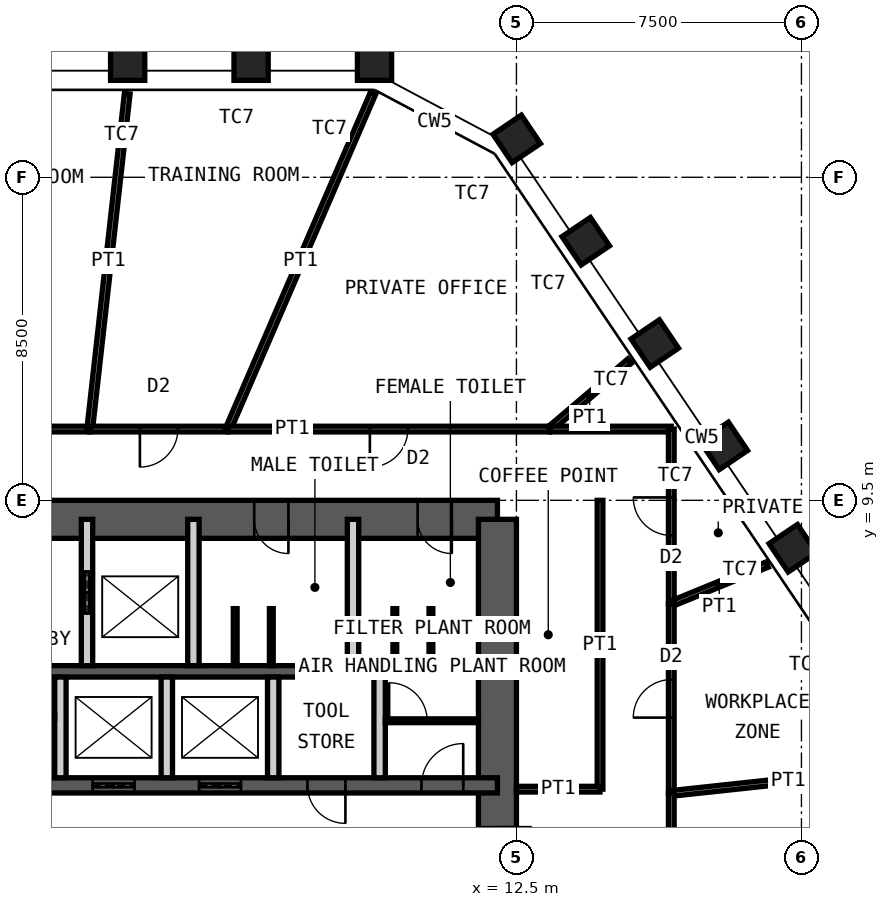
"""IFC4 building model, lengths in metres.
Left out: names, types, materials, properties, quantities, classifications, styles, units other than length and angle.
Written with IfcOpenShell. Run it as: python <this file> out.ifc"""

import sys

from ifc_helpers import new_model, si_unit, direction, frame, frame_2d, origin, origin_2d, place, context, subcontext, project, spatial, rectangle, hollow_rectangle, extrude, element, fill, save


model = new_model("IFC4")
c1 = context("Model", 3, precision=1e-05, world=origin(), true_north=direction((0.0, 1.0)))
c2 = subcontext(c1, "Body", "Model", "MODEL_VIEW")
j1 = project(units=[si_unit("LENGTHUNIT", "METRE"), si_unit("PLANEANGLEUNIT", "RADIAN")], contexts=[c1])
p1 = place(None, origin())
s1 = spatial("IfcSite", under=j1, at=p1, CompositionType="ELEMENT")
p2 = place(p1, origin())
s2 = spatial("IfcBuilding", under=s1, at=p2, CompositionType="ELEMENT")
p3 = place(p2, frame((0.0, 0.0, 278.8)))
s3 = spatial("IfcBuildingStorey", under=s2, at=p3, CompositionType="ELEMENT", Elevation=278.8)
for number, where, z_axis, x_axis in (
    (1, (2.27, 21.0, 0.0), (0.0, 0.0, 1.0), (-1.0, 0.0, 0.0)),
    (2, (5.518, 21.0, 0.0), (0.0, 0.0, 1.0), (-1.0, 0.0, 0.0)),
    (3, (8.766, 21.0, 0.0), (0.0, 0.0, 1.0), (-1.0, 0.0, 0.0)),
    (4, (12.508, 19.01, 0.0), (0.0, 0.0, 1.0), (-0.559, 0.829, 0.0)),
    (5, (14.324, 16.318, 0.0), (0.0, 0.0, 1.0), (-0.559, 0.829, 0.0)),
    (6, (16.141, 13.625, 0.0), (0.0, 0.0, 1.0), (-0.559, 0.829, 0.0)),
    (7, (17.957, 10.932, 0.0), (0.0, 0.0, 1.0), (-0.559, 0.829, 0.0)),
    (8, (19.773, 8.239, 0.0), (0.0, 0.0, 1.0), (-0.559, 0.829, 0.0)),
):
    element("IfcColumn", number, at=place(p3, frame(where, z_axis=z_axis, x_axis=x_axis)), inside=s3, PredefinedType="COLUMN", context=c2, shape_type="SweptSolid", body=[
        extrude(hollow_rectangle(XDim=0.9, YDim=0.9, WallThickness=0.06, at=origin_2d()), origin(), (0.0, 0.0, 1.0), 4.2),
    ])
p4 = place(p3, frame((-12.0, 9.0, 0.0), z_axis=(0.0, 0.0, 1.0), x_axis=(1.0, 0.0, 0.0)))
e9 = element("IfcWall", 9, at=p4, inside=s3, PredefinedType="SHEAR", context=c2, shape_type="SweptSolid", body=[
    extrude(rectangle(XDim=24.0, YDim=1.0, at=frame_2d((12.0, 0.0))), origin(), (0.0, 0.0, 1.0), 4.2),
])
p5 = place(p4, frame((10.4, 0.0, 0.0)))
e10 = element("IfcOpeningElement", 10, at=p5, cuts=e9, PredefinedType="OPENING", context=c2, shape_type="SweptSolid", body=[
    extrude(rectangle(XDim=1.0, YDim=2.1, at=frame_2d((0.5, 1.05))), frame((0.0, 0.51, 0.0), z_axis=(0.0, -1.0, 0.0), x_axis=(1.0, 0.0, 0.0)), (0.0, 0.0, 1.0), 1.02),
])
p6 = place(p4, frame((17.6, 0.0, 0.0)))
e11 = element("IfcOpeningElement", 11, at=p6, cuts=e9, PredefinedType="OPENING", context=c2, shape_type="SweptSolid", body=[
    extrude(rectangle(XDim=0.9, YDim=2.1, at=frame_2d((0.45, 1.05))), frame((0.0, 0.51, 0.0), z_axis=(0.0, -1.0, 0.0), x_axis=(1.0, 0.0, 0.0)), (0.0, 0.0, 1.0), 1.02),
])
p7 = place(p4, frame((21.9, 0.0, 0.0)))
e12 = element("IfcOpeningElement", 12, at=p7, cuts=e9, PredefinedType="OPENING", context=c2, shape_type="SweptSolid", body=[
    extrude(rectangle(XDim=0.9, YDim=2.1, at=frame_2d((0.45, 1.05))), frame((0.0, 0.51, 0.0), z_axis=(0.0, -1.0, 0.0), x_axis=(1.0, 0.0, 0.0)), (0.0, 0.0, 1.0), 1.02),
])
p8 = place(p3, frame((12.0, -9.0, 0.0), z_axis=(0.0, 0.0, 1.0), x_axis=(0.0, 1.0, 0.0)))
e13 = element("IfcWall", 13, at=p8, inside=s3, PredefinedType="SHEAR", context=c2, shape_type="SweptSolid", body=[
    extrude(rectangle(XDim=18.0, YDim=1.0, at=frame_2d((9.0, 0.0))), origin(), (0.0, 0.0, 1.0), 4.2),
])
p9 = place(p8, frame((8.1, 0.0, 0.0)))
e14 = element("IfcOpeningElement", 14, at=p9, cuts=e13, PredefinedType="OPENING", context=c2, shape_type="SweptSolid", body=[
    extrude(rectangle(XDim=1.8, YDim=2.1, at=frame_2d((0.9, 1.05))), frame((0.0, 0.51, 0.0), z_axis=(0.0, -1.0, 0.0), x_axis=(1.0, 0.0, 0.0)), (0.0, 0.0, 1.0), 1.02),
])
p10 = place(p3, frame((-12.0, 5.0, 0.0), z_axis=(0.0, 0.0, 1.0), x_axis=(1.0, 0.0, 0.0)))
e15 = element("IfcWall", 15, at=p10, inside=s3, PredefinedType="SHEAR", context=c2, shape_type="SweptSolid", body=[
    extrude(rectangle(XDim=24.0, YDim=0.3, at=frame_2d((12.0, 0.0))), origin(), (0.0, 0.0, 1.0), 4.2),
])
p11 = place(p3, frame((-12.0, 2.0, 0.0), z_axis=(0.0, 0.0, 1.0), x_axis=(1.0, 0.0, 0.0)))
e16 = element("IfcWall", 16, at=p11, inside=s3, PredefinedType="SHEAR", context=c2, shape_type="SweptSolid", body=[
    extrude(rectangle(XDim=24.0, YDim=0.4, at=frame_2d((12.0, 0.0))), origin(), (0.0, 0.0, 1.0), 4.2),
])
p12 = place(p11, frame((2.4, 0.0, 0.0)))
e17 = element("IfcOpeningElement", 17, at=p12, cuts=e16, PredefinedType="OPENING", context=c2, shape_type="SweptSolid", body=[
    extrude(rectangle(XDim=1.1, YDim=2.1, at=frame_2d((0.55, 1.05))), frame((0.0, 0.21, 0.0), z_axis=(0.0, -1.0, 0.0), x_axis=(1.0, 0.0, 0.0)), (0.0, 0.0, 1.0), 0.42),
])
p13 = place(p11, frame((22.0, 0.0, 0.0)))
e18 = element("IfcOpeningElement", 18, at=p13, cuts=e16, PredefinedType="OPENING", context=c2, shape_type="SweptSolid", body=[
    extrude(rectangle(XDim=1.1, YDim=2.1, at=frame_2d((0.55, 1.05))), frame((0.0, 0.21, 0.0), z_axis=(0.0, -1.0, 0.0), x_axis=(1.0, 0.0, 0.0)), (0.0, 0.0, 1.0), 0.42),
])
p14 = place(p11, frame((10.15, 0.0, 0.0)))
e19 = element("IfcOpeningElement", 19, at=p14, cuts=e16, PredefinedType="OPENING", context=c2, shape_type="SweptSolid", body=[
    extrude(rectangle(XDim=1.0, YDim=2.1, at=frame_2d((0.5, 1.05))), frame((0.0, 0.21, 0.0), z_axis=(0.0, -1.0, 0.0), x_axis=(1.0, 0.0, 0.0)), (0.0, 0.0, 1.0), 0.42),
])
p15 = place(p11, frame((6.9, 0.0, 0.0)))
e20 = element("IfcOpeningElement", 20, at=p15, cuts=e16, PredefinedType="OPENING", context=c2, shape_type="SweptSolid", body=[
    extrude(rectangle(XDim=1.0, YDim=2.1, at=frame_2d((0.5, 1.05))), frame((0.0, 0.21, 0.0), z_axis=(0.0, -1.0, 0.0), x_axis=(1.0, 0.0, 0.0)), (0.0, 0.0, 1.0), 0.42),
])
p16 = place(p11, frame((13.35, 0.0, 0.0)))
e21 = element("IfcOpeningElement", 21, at=p16, cuts=e16, PredefinedType="OPENING", context=c2, shape_type="SweptSolid", body=[
    extrude(rectangle(XDim=1.1, YDim=2.4, at=frame_2d((0.55, 1.2))), frame((0.0, 0.21, 0.0), z_axis=(0.0, -1.0, 0.0), x_axis=(1.0, 0.0, 0.0)), (0.0, 0.0, 1.0), 0.42),
])
p17 = place(p11, frame((16.15, 0.0, 0.0)))
e22 = element("IfcOpeningElement", 22, at=p17, cuts=e16, PredefinedType="OPENING", context=c2, shape_type="SweptSolid", body=[
    extrude(rectangle(XDim=1.1, YDim=2.4, at=frame_2d((0.55, 1.2))), frame((0.0, 0.21, 0.0), z_axis=(0.0, -1.0, 0.0), x_axis=(1.0, 0.0, 0.0)), (0.0, 0.0, 1.0), 0.42),
])
p18 = place(p11, frame((19.0, 0.0, 0.0)))
e23 = element("IfcOpeningElement", 23, at=p18, cuts=e16, PredefinedType="OPENING", context=c2, shape_type="SweptSolid", body=[
    extrude(rectangle(XDim=1.0, YDim=2.1, at=frame_2d((0.5, 1.05))), frame((0.0, 0.21, 0.0), z_axis=(0.0, -1.0, 0.0), x_axis=(1.0, 0.0, 0.0)), (0.0, 0.0, 1.0), 0.42),
])
p19 = place(p3, frame((1.2, 5.15, 0.0), z_axis=(0.0, 0.0, 1.0), x_axis=(0.0, 1.0, 0.0)))
e24 = element("IfcWall", 24, at=p19, inside=s3, PredefinedType="PARTITIONING", context=c2, shape_type="SweptSolid", body=[
    extrude(rectangle(XDim=3.85, YDim=0.3, at=frame_2d((1.925, 0.0))), origin(), (0.0, 0.0, 1.0), 3.98),
])
p20 = place(p19, frame((1.375, 0.0, 0.0)))
e25 = element("IfcOpeningElement", 25, at=p20, cuts=e24, PredefinedType="OPENING", context=c2, shape_type="SweptSolid", body=[
    extrude(rectangle(XDim=1.1, YDim=2.4, at=frame_2d((0.55, 1.2))), frame((0.0, 0.16, 0.0), z_axis=(0.0, -1.0, 0.0), x_axis=(1.0, 0.0, 0.0)), (0.0, 0.0, 1.0), 0.32),
])
for number, where, z_axis, x_axis in (
    (26, (4.0, 5.15, 0.0), (0.0, 0.0, 1.0), (0.0, 1.0, 0.0)),
    (27, (8.2, 5.15, 0.0), (0.0, 0.0, 1.0), (0.0, 1.0, 0.0)),
):
    element("IfcWall", number, at=place(p3, frame(where, z_axis=z_axis, x_axis=x_axis)), inside=s3, PredefinedType="PARTITIONING", context=c2, shape_type="SweptSolid", body=[
        extrude(rectangle(XDim=3.85, YDim=0.3, at=frame_2d((1.925, 0.0))), origin(), (0.0, 0.0, 1.0), 3.98),
    ])
for number, where, z_axis, x_axis in (
    (28, (0.5, 2.2, 0.0), (0.0, 0.0, 1.0), (0.0, 1.0, 0.0)),
    (29, (3.3, 2.2, 0.0), (0.0, 0.0, 1.0), (0.0, 1.0, 0.0)),
    (30, (6.1, 2.2, 0.0), (0.0, 0.0, 1.0), (0.0, 1.0, 0.0)),
    (31, (8.9, 2.2, 0.0), (0.0, 0.0, 1.0), (0.0, 1.0, 0.0)),
):
    element("IfcWall", number, at=place(p3, frame(where, z_axis=z_axis, x_axis=x_axis)), inside=s3, PredefinedType="PARTITIONING", context=c2, shape_type="SweptSolid", body=[
        extrude(rectangle(XDim=2.65, YDim=0.3, at=frame_2d((1.325, 0.0))), origin(), (0.0, 0.0, 1.0), 3.98),
    ])
p21 = place(p3, frame((-2.85, 3.8, 0.0), z_axis=(0.0, 0.0, 1.0), x_axis=(1.0, 0.0, 0.0)))
e32 = element("IfcWall", 32, at=p21, inside=s3, PredefinedType="PARTITIONING", context=c2, shape_type="SweptSolid", body=[
    extrude(rectangle(XDim=3.2, YDim=0.1, at=frame_2d((1.6, 0.0))), origin(), (0.0, 0.0, 1.0), 3.98),
])
p22 = place(p21, frame((0.1, 0.0, 0.0)))
e33 = element("IfcOpeningElement", 33, at=p22, cuts=e32, PredefinedType="OPENING", context=c2, shape_type="SweptSolid", body=[
    extrude(rectangle(XDim=1.0, YDim=2.4, at=frame_2d((0.5, 1.2))), frame((0.0, 0.06, 0.0), z_axis=(0.0, -1.0, 0.0), x_axis=(1.0, 0.0, 0.0)), (0.0, 0.0, 1.0), 0.12),
])
p23 = place(p3, frame((9.05, 3.7, 0.0), z_axis=(0.0, 0.0, 1.0), x_axis=(1.0, 0.0, 0.0)))
e34 = element("IfcWall", 34, at=p23, inside=s3, PredefinedType="PARTITIONING", context=c2, shape_type="SweptSolid", body=[
    extrude(rectangle(XDim=2.45, YDim=0.1, at=frame_2d((1.225, 0.0))), origin(), (0.0, 0.0, 1.0), 3.98),
])
p24 = place(p23, frame((0.1, 0.0, 0.0)))
e35 = element("IfcOpeningElement", 35, at=p24, cuts=e34, PredefinedType="OPENING", context=c2, shape_type="SweptSolid", body=[
    extrude(rectangle(XDim=1.0, YDim=2.4, at=frame_2d((0.5, 1.2))), frame((0.0, 0.06, 0.0), z_axis=(0.0, -1.0, 0.0), x_axis=(1.0, 0.0, 0.0)), (0.0, 0.0, 1.0), 0.12),
])
for number, where, z_axis, x_axis in (
    (36, (5.1, 5.15, 0.0), (0.0, 0.0, 1.0), (0.0, 1.0, 0.0)),
    (37, (6.05, 5.15, 0.0), (0.0, 0.0, 1.0), (0.0, 1.0, 0.0)),
    (38, (9.3, 5.15, 0.0), (0.0, 0.0, 1.0), (0.0, 1.0, 0.0)),
    (39, (10.25, 5.15, 0.0), (0.0, 0.0, 1.0), (0.0, 1.0, 0.0)),
):
    element("IfcWall", number, at=place(p3, frame(where, z_axis=z_axis, x_axis=x_axis)), inside=s3, PredefinedType="PARTITIONING", context=c2, shape_type="SweptSolid", body=[
        extrude(rectangle(XDim=1.5, YDim=0.1, at=frame_2d((0.75, 0.0))), origin(), (0.0, 0.0, 1.0), 2.1),
    ])
p25 = place(p3, frame((-2.368, 11.375, 0.0), z_axis=(0.0, 0.0, 1.0), x_axis=(1.0, 0.0, 0.0)))
e40 = element("IfcWall", 40, at=p25, inside=s3, PredefinedType="PARTITIONING", context=c2, shape_type="SweptSolid", body=[
    extrude(rectangle(XDim=3.64, YDim=0.15, at=frame_2d((1.82, 0.0))), origin(), (0.0, 0.0, 1.0), 4.03),
])
p26 = place(p25, frame((1.32, 0.0, 0.0)))
e41 = element("IfcOpeningElement", 41, at=p26, cuts=e40, PredefinedType="OPENING", context=c2, shape_type="SweptSolid", body=[
    extrude(rectangle(XDim=1.0, YDim=2.4, at=frame_2d((0.5, 1.2))), frame((0.0, 0.085, 0.0), z_axis=(0.0, -1.0, 0.0), x_axis=(1.0, 0.0, 0.0)), (0.0, 0.0, 1.0), 0.17),
])
p27 = place(p3, frame((2.259, 20.201, 0.0), z_axis=(0.0, 0.0, 1.0), x_axis=(-0.11111945026, -0.993807057619, 0.0)))
e42 = element("IfcWall", 42, at=p27, inside=s3, PredefinedType="PARTITIONING", context=c2, shape_type="SweptSolid", body=[
    extrude(rectangle(XDim=8.881, YDim=0.15, at=frame_2d((4.44, 0.0))), origin(), (0.0, 0.0, 1.0), 3.33),
])
p28 = place(p3, frame((1.272, 11.375, 0.0), z_axis=(0.0, 0.0, 1.0), x_axis=(1.0, 0.0, 0.0)))
e43 = element("IfcWall", 43, at=p28, inside=s3, PredefinedType="PARTITIONING", context=c2, shape_type="SweptSolid", body=[
    extrude(rectangle(XDim=3.64, YDim=0.15, at=frame_2d((1.82, 0.0))), origin(), (0.0, 0.0, 1.0), 4.03),
])
p29 = place(p28, frame((1.32, 0.0, 0.0)))
e44 = element("IfcOpeningElement", 44, at=p29, cuts=e43, PredefinedType="OPENING", context=c2, shape_type="SweptSolid", body=[
    extrude(rectangle(XDim=1.0, YDim=2.4, at=frame_2d((0.5, 1.2))), frame((0.0, 0.085, 0.0), z_axis=(0.0, -1.0, 0.0), x_axis=(1.0, 0.0, 0.0)), (0.0, 0.0, 1.0), 0.17),
])
p30 = place(p3, frame((8.726, 20.208, 0.0), z_axis=(0.0, 0.0, 1.0), x_axis=(-0.396444279146, -0.918058785445, 0.0)))
e45 = element("IfcWall", 45, at=p30, inside=s3, PredefinedType="PARTITIONING", context=c2, shape_type="SweptSolid", body=[
    extrude(rectangle(XDim=9.622, YDim=0.15, at=frame_2d((4.811, 0.0))), origin(), (0.0, 0.0, 1.0), 2.93),
])
p31 = place(p3, frame((4.912, 11.375, 0.0), z_axis=(0.0, 0.0, 1.0), x_axis=(1.0, 0.0, 0.0)))
e46 = element("IfcWall", 46, at=p31, inside=s3, PredefinedType="PARTITIONING", context=c2, shape_type="SweptSolid", body=[
    extrude(rectangle(XDim=8.463, YDim=0.15, at=frame_2d((4.231, 0.0))), origin(), (0.0, 0.0, 1.0), 4.03),
])
p32 = place(p31, frame((3.731, 0.0, 0.0)))
e47 = element("IfcOpeningElement", 47, at=p32, cuts=e46, PredefinedType="OPENING", context=c2, shape_type="SweptSolid", body=[
    extrude(rectangle(XDim=1.0, YDim=2.4, at=frame_2d((0.5, 1.2))), frame((0.0, 0.085, 0.0), z_axis=(0.0, -1.0, 0.0), x_axis=(1.0, 0.0, 0.0)), (0.0, 0.0, 1.0), 0.17),
])
p33 = place(p3, frame((15.484, 13.169, 0.0), z_axis=(0.0, 0.0, 1.0), x_axis=(-0.761734753955, -0.647889006403, 0.0)))
e48 = element("IfcWall", 48, at=p33, inside=s3, PredefinedType="PARTITIONING", context=c2, shape_type="SweptSolid", body=[
    extrude(rectangle(XDim=2.769, YDim=0.15, at=frame_2d((1.384, 0.0))), origin(), (0.0, 0.0, 1.0), 3.33),
])
p34 = place(p3, frame((13.375, 11.375, 0.0), z_axis=(0.0, 0.0, 1.0), x_axis=(1.0, 0.0, 0.0)))
e49 = element("IfcWall", 49, at=p34, inside=s3, PredefinedType="PARTITIONING", context=c2, shape_type="SweptSolid", body=[
    extrude(rectangle(XDim=3.2, YDim=0.15, at=frame_2d((1.6, 0.0))), origin(), (0.0, 0.0, 1.0), 4.03),
])
p35 = place(p3, frame((16.575, 11.375, 0.0), z_axis=(0.0, 0.0, 1.0), x_axis=(0.0, -1.0, 0.0)))
e50 = element("IfcWall", 50, at=p35, inside=s3, PredefinedType="PARTITIONING", context=c2, shape_type="SweptSolid", body=[
    extrude(rectangle(XDim=4.597, YDim=0.15, at=frame_2d((2.299, 0.0))), origin(), (0.0, 0.0, 1.0), 4.03),
])
p36 = place(p35, frame((1.799, 0.0, 0.0)))
e51 = element("IfcOpeningElement", 51, at=p36, cuts=e50, PredefinedType="OPENING", context=c2, shape_type="SweptSolid", body=[
    extrude(rectangle(XDim=1.0, YDim=2.4, at=frame_2d((0.5, 1.2))), frame((0.0, 0.085, 0.0), z_axis=(0.0, -1.0, 0.0), x_axis=(1.0, 0.0, 0.0)), (0.0, 0.0, 1.0), 0.17),
])
p37 = place(p3, frame((19.1, 7.81, 0.0), z_axis=(0.0, 0.0, 1.0), x_axis=(-0.925616791812, -0.378462091518, 0.0)))
e52 = element("IfcWall", 52, at=p37, inside=s3, PredefinedType="PARTITIONING", context=c2, shape_type="SweptSolid", body=[
    extrude(rectangle(XDim=2.728, YDim=0.15, at=frame_2d((1.364, 0.0))), origin(), (0.0, 0.0, 1.0), 3.33),
])
p38 = place(p3, frame((16.575, 6.778, 0.0), z_axis=(0.0, 0.0, 1.0), x_axis=(0.0, -1.0, 0.0)))
e53 = element("IfcWall", 53, at=p38, inside=s3, PredefinedType="PARTITIONING", context=c2, shape_type="SweptSolid", body=[
    extrude(rectangle(XDim=4.99, YDim=0.15, at=frame_2d((2.495, 0.0))), origin(), (0.0, 0.0, 1.0), 4.03),
])
p39 = place(p38, frame((1.995, 0.0, 0.0)))
e54 = element("IfcOpeningElement", 54, at=p39, cuts=e53, PredefinedType="OPENING", context=c2, shape_type="SweptSolid", body=[
    extrude(rectangle(XDim=1.0, YDim=2.4, at=frame_2d((0.5, 1.2))), frame((0.0, 0.085, 0.0), z_axis=(0.0, -1.0, 0.0), x_axis=(1.0, 0.0, 0.0)), (0.0, 0.0, 1.0), 0.17),
])
p40 = place(p3, frame((22.726, 2.452, 0.0), z_axis=(0.0, 0.0, 1.0), x_axis=(-0.994230957157, -0.107260448581, 0.0)))
e55 = element("IfcWall", 55, at=p40, inside=s3, PredefinedType="PARTITIONING", context=c2, shape_type="SweptSolid", body=[
    extrude(rectangle(XDim=6.187, YDim=0.15, at=frame_2d((3.093, 0.0))), origin(), (0.0, 0.0, 1.0), 4.03),
])
p41 = place(p3, frame((16.575, 1.788, 0.0), z_axis=(0.0, 0.0, 1.0), x_axis=(0.0, -1.0, 0.0)))
e56 = element("IfcWall", 56, at=p41, inside=s3, PredefinedType="PARTITIONING", context=c2, shape_type="SweptSolid", body=[
    extrude(rectangle(XDim=4.647, YDim=0.15, at=frame_2d((2.324, 0.0))), origin(), (0.0, 0.0, 1.0), 4.03),
])
p42 = place(p41, frame((1.824, 0.0, 0.0)))
e57 = element("IfcOpeningElement", 57, at=p42, cuts=e56, PredefinedType="OPENING", context=c2, shape_type="SweptSolid", body=[
    extrude(rectangle(XDim=1.0, YDim=2.4, at=frame_2d((0.5, 1.2))), frame((0.0, 0.085, 0.0), z_axis=(0.0, -1.0, 0.0), x_axis=(1.0, 0.0, 0.0)), (0.0, 0.0, 1.0), 0.17),
])
p43 = place(p3, frame((14.7, 1.9, 0.0), z_axis=(0.0, 0.0, 1.0), x_axis=(0.0, 1.0, 0.0)))
e58 = element("IfcWall", 58, at=p43, inside=s3, PredefinedType="PARTITIONING", context=c2, shape_type="SweptSolid", body=[
    extrude(rectangle(XDim=7.6, YDim=0.15, at=frame_2d((3.8, 0.0))), origin(), (0.0, 0.0, 1.0), 4.03),
])
p44 = place(p3, frame((12.5, 1.9, 0.0), z_axis=(0.0, 0.0, 1.0), x_axis=(1.0, 0.0, 0.0)))
e59 = element("IfcWall", 59, at=p44, inside=s3, PredefinedType="PARTITIONING", context=c2, shape_type="SweptSolid", body=[
    extrude(rectangle(XDim=2.2, YDim=0.15, at=frame_2d((1.1, 0.0))), origin(), (0.0, 0.0, 1.0), 2.93),
])
p45 = place(p6, origin())
e60 = element("IfcDoor", 60, at=p45, inside=s3, OperationType="SINGLE_SWING_RIGHT", PredefinedType="DOOR", context=c2, shape_type="SweptSolid", body=[
    extrude(rectangle(XDim=0.9, YDim=2.1, at=frame_2d((0.45, 1.05))), frame((0.0, 0.025, 0.0), z_axis=(0.0, -1.0, 0.0), x_axis=(1.0, 0.0, 0.0)), (0.0, 0.0, 1.0), 0.05),
])
fill(e11, e60)
p46 = place(p7, origin())
e61 = element("IfcDoor", 61, at=p46, inside=s3, OperationType="SINGLE_SWING_RIGHT", PredefinedType="DOOR", context=c2, shape_type="SweptSolid", body=[
    extrude(rectangle(XDim=0.9, YDim=2.1, at=frame_2d((0.45, 1.05))), frame((0.0, 0.025, 0.0), z_axis=(0.0, -1.0, 0.0), x_axis=(1.0, 0.0, 0.0)), (0.0, 0.0, 1.0), 0.05),
])
fill(e12, e61)
p47 = place(p13, origin())
e62 = element("IfcDoor", 62, at=p47, inside=s3, OperationType="SINGLE_SWING_LEFT", PredefinedType="DOOR", context=c2, shape_type="SweptSolid", body=[
    extrude(rectangle(XDim=1.1, YDim=2.1, at=frame_2d((0.55, 1.05))), frame((0.0, 0.025, 0.0), z_axis=(0.0, -1.0, 0.0), x_axis=(1.0, 0.0, 0.0)), (0.0, 0.0, 1.0), 0.05),
])
fill(e18, e62)
p48 = place(p9, origin())
e63 = element("IfcDoor", 63, at=p48, inside=s3, OperationType="DOUBLE_DOOR_DOUBLE_SWING", PredefinedType="DOOR", context=c2, shape_type="SweptSolid", body=[
    extrude(rectangle(XDim=1.8, YDim=2.1, at=frame_2d((0.9, 1.05))), frame((0.0, 0.025, 0.0), z_axis=(0.0, -1.0, 0.0), x_axis=(1.0, 0.0, 0.0)), (0.0, 0.0, 1.0), 0.05),
])
fill(e14, e63)
p49 = place(p20, origin())
e64 = element("IfcDoor", 64, at=p49, inside=s3, OperationType="DOUBLE_DOOR_SLIDING", PredefinedType="DOOR", context=c2, shape_type="SweptSolid", body=[
    extrude(rectangle(XDim=1.1, YDim=2.4, at=frame_2d((0.55, 1.2))), frame((0.0, 0.025, 0.0), z_axis=(0.0, -1.0, 0.0), x_axis=(1.0, 0.0, 0.0)), (0.0, 0.0, 1.0), 0.05),
])
fill(e25, e64)
p50 = place(p16, origin())
e65 = element("IfcDoor", 65, at=p50, inside=s3, OperationType="DOUBLE_DOOR_SLIDING", PredefinedType="DOOR", context=c2, shape_type="SweptSolid", body=[
    extrude(rectangle(XDim=1.1, YDim=2.4, at=frame_2d((0.55, 1.2))), frame((0.0, 0.025, 0.0), z_axis=(0.0, -1.0, 0.0), x_axis=(1.0, 0.0, 0.0)), (0.0, 0.0, 1.0), 0.05),
])
fill(e21, e65)
p51 = place(p17, origin())
e66 = element("IfcDoor", 66, at=p51, inside=s3, OperationType="DOUBLE_DOOR_SLIDING", PredefinedType="DOOR", context=c2, shape_type="SweptSolid", body=[
    extrude(rectangle(XDim=1.1, YDim=2.4, at=frame_2d((0.55, 1.2))), frame((0.0, 0.025, 0.0), z_axis=(0.0, -1.0, 0.0), x_axis=(1.0, 0.0, 0.0)), (0.0, 0.0, 1.0), 0.05),
])
fill(e22, e66)
p52 = place(p18, origin())
e67 = element("IfcDoor", 67, at=p52, inside=s3, OperationType="SINGLE_SWING_RIGHT", PredefinedType="DOOR", context=c2, shape_type="SweptSolid", body=[
    extrude(rectangle(XDim=1.0, YDim=2.1, at=frame_2d((0.5, 1.05))), frame((0.0, 0.025, 0.0), z_axis=(0.0, -1.0, 0.0), x_axis=(1.0, 0.0, 0.0)), (0.0, 0.0, 1.0), 0.05),
])
fill(e23, e67)
p53 = place(p24, origin())
e68 = element("IfcDoor", 68, at=p53, inside=s3, OperationType="SINGLE_SWING_RIGHT", PredefinedType="DOOR", context=c2, shape_type="SweptSolid", body=[
    extrude(rectangle(XDim=1.0, YDim=2.4, at=frame_2d((0.5, 1.2))), frame((0.0, 0.025, 0.0), z_axis=(0.0, -1.0, 0.0), x_axis=(1.0, 0.0, 0.0)), (0.0, 0.0, 1.0), 0.05),
])
fill(e35, e68)
p54 = place(p29, origin())
e69 = element("IfcDoor", 69, at=p54, inside=s3, OperationType="SINGLE_SWING_LEFT", PredefinedType="DOOR", context=c2, shape_type="SweptSolid", body=[
    extrude(rectangle(XDim=1.0, YDim=2.4, at=frame_2d((0.5, 1.2))), frame((0.0, 0.025, 0.0), z_axis=(0.0, -1.0, 0.0), x_axis=(1.0, 0.0, 0.0)), (0.0, 0.0, 1.0), 0.05),
])
fill(e44, e69)
p55 = place(p32, origin())
e70 = element("IfcDoor", 70, at=p55, inside=s3, OperationType="SINGLE_SWING_LEFT", PredefinedType="DOOR", context=c2, shape_type="SweptSolid", body=[
    extrude(rectangle(XDim=1.0, YDim=2.4, at=frame_2d((0.5, 1.2))), frame((0.0, 0.025, 0.0), z_axis=(0.0, -1.0, 0.0), x_axis=(1.0, 0.0, 0.0)), (0.0, 0.0, 1.0), 0.05),
])
fill(e47, e70)
p56 = place(p36, origin())
e71 = element("IfcDoor", 71, at=p56, inside=s3, OperationType="SINGLE_SWING_LEFT", PredefinedType="DOOR", context=c2, shape_type="SweptSolid", body=[
    extrude(rectangle(XDim=1.0, YDim=2.4, at=frame_2d((0.5, 1.2))), frame((0.0, 0.025, 0.0), z_axis=(0.0, -1.0, 0.0), x_axis=(1.0, 0.0, 0.0)), (0.0, 0.0, 1.0), 0.05),
])
fill(e51, e71)
p57 = place(p39, origin())
e72 = element("IfcDoor", 72, at=p57, inside=s3, OperationType="SINGLE_SWING_RIGHT", PredefinedType="DOOR", context=c2, shape_type="SweptSolid", body=[
    extrude(rectangle(XDim=1.0, YDim=2.4, at=frame_2d((0.5, 1.2))), frame((0.0, 0.025, 0.0), z_axis=(0.0, -1.0, 0.0), x_axis=(1.0, 0.0, 0.0)), (0.0, 0.0, 1.0), 0.05),
])
fill(e54, e72)
save(model, sys.argv[1])
